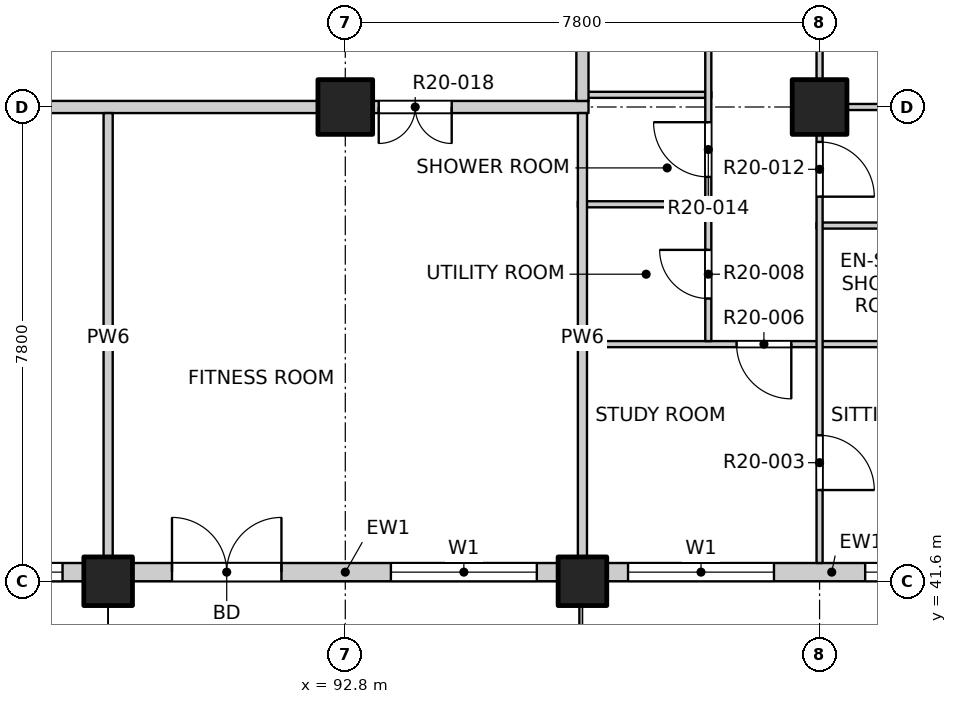
"""IFC4 building model, lengths in metres.
Left out: names, types, materials, properties, quantities, classifications, styles, units other than length and angle.
Written with IfcOpenShell. Run it as: python <this file> out.ifc"""

import sys

from ifc_helpers import new_model, si_unit, direction, frame, frame_2d, origin, origin_2d, place, context, subcontext, project, spatial, rectangle, extrude, element, fill, save


model = new_model("IFC4")
c1 = context("Model", 3, precision=1e-05, world=origin(), true_north=direction((0.0, 1.0)))
c2 = subcontext(c1, "Body", "Model", "MODEL_VIEW")
j1 = project(units=[si_unit("LENGTHUNIT", "METRE"), si_unit("PLANEANGLEUNIT", "RADIAN")], contexts=[c1])
p1 = place(None, origin())
s1 = spatial("IfcSite", under=j1, at=p1, CompositionType="ELEMENT")
p2 = place(p1, origin())
s2 = spatial("IfcBuilding", under=s1, at=p2, CompositionType="ELEMENT")
p3 = place(p2, frame((0.0, 0.0, 204.1)))
s3 = spatial("IfcBuildingStorey", under=s2, at=p3, CompositionType="ELEMENT", Elevation=204.1)
for number, where, z_axis, x_axis in (
    (1, (88.9, 41.6, -0.25), (0.0, 0.0, 1.0), (1.0, 0.0, 0.0)),
    (2, (96.7, 41.6, -0.25), (0.0, 0.0, 1.0), (1.0, 0.0, 0.0)),
):
    element("IfcColumn", number, at=place(p3, frame(where, z_axis=z_axis, x_axis=x_axis)), inside=s3, PredefinedType="COLUMN", context=c2, shape_type="SweptSolid", body=[
        extrude(rectangle(XDim=0.8, YDim=0.8, at=origin_2d()), origin(), (0.0, 0.0, 1.0), 3.4),
    ])
for number, where, z_axis, x_axis in (
    (3, (92.8, 49.4, -0.25), (0.0, 0.0, 1.0), (1.0, 0.0, 0.0)),
    (4, (100.6, 49.4, -0.25), (0.0, 0.0, 1.0), (1.0, 0.0, 0.0)),
):
    element("IfcColumn", number, at=place(p3, frame(where, z_axis=z_axis, x_axis=x_axis)), inside=s3, PredefinedType="COLUMN", context=c2, shape_type="SweptSolid", body=[
        extrude(rectangle(XDim=0.9, YDim=0.9, at=origin_2d()), origin(), (0.0, 0.0, 1.0), 3.4),
    ])
p4 = place(p3, frame((81.5, 41.75, 0.0), z_axis=(0.0, 0.0, 1.0), x_axis=(1.0, 0.0, 0.0)))
e5 = element("IfcWall", 5, at=p4, inside=s3, PredefinedType="SOLIDWALL", context=c2, shape_type="SweptSolid", body=[
    extrude(rectangle(XDim=7.0, YDim=0.3, at=frame_2d((3.5, 0.0))), origin(), (0.0, 0.0, 1.0), 2.7),
])
p5 = place(p4, frame((0.65, 0.0, 0.0)))
e6 = element("IfcOpeningElement", 6, at=p5, cuts=e5, PredefinedType="OPENING", context=c2, shape_type="SweptSolid", body=[
    extrude(rectangle(XDim=1.8, YDim=2.4, at=frame_2d((0.9, 1.2))), frame((0.0, 0.16, 0.0), z_axis=(0.0, -1.0, 0.0), x_axis=(1.0, 0.0, 0.0)), (0.0, 0.0, 1.0), 0.32),
])
p6 = place(p4, frame((4.25, 0.0, 0.9)))
e7 = element("IfcOpeningElement", 7, at=p6, cuts=e5, PredefinedType="OPENING", context=c2, shape_type="SweptSolid", body=[
    extrude(rectangle(XDim=2.4, YDim=1.8, at=frame_2d((1.2, 0.9))), frame((0.0, 0.16, 0.0), z_axis=(0.0, -1.0, 0.0), x_axis=(1.0, 0.0, 0.0)), (0.0, 0.0, 1.0), 0.32),
])
p7 = place(p3, frame((89.3, 41.75, 0.0), z_axis=(0.0, 0.0, 1.0), x_axis=(1.0, 0.0, 0.0)))
e8 = element("IfcWall", 8, at=p7, inside=s3, PredefinedType="SOLIDWALL", context=c2, shape_type="SweptSolid", body=[
    extrude(rectangle(XDim=7.0, YDim=0.3, at=frame_2d((3.5, 0.0))), origin(), (0.0, 0.0, 1.0), 2.7),
])
p8 = place(p7, frame((0.65, 0.0, 0.0)))
e9 = element("IfcOpeningElement", 9, at=p8, cuts=e8, PredefinedType="OPENING", context=c2, shape_type="SweptSolid", body=[
    extrude(rectangle(XDim=1.8, YDim=2.4, at=frame_2d((0.9, 1.2))), frame((0.0, 0.16, 0.0), z_axis=(0.0, -1.0, 0.0), x_axis=(1.0, 0.0, 0.0)), (0.0, 0.0, 1.0), 0.32),
])
p9 = place(p7, frame((4.25, 0.0, 0.9)))
e10 = element("IfcOpeningElement", 10, at=p9, cuts=e8, PredefinedType="OPENING", context=c2, shape_type="SweptSolid", body=[
    extrude(rectangle(XDim=2.4, YDim=1.8, at=frame_2d((1.2, 0.9))), frame((0.0, 0.16, 0.0), z_axis=(0.0, -1.0, 0.0), x_axis=(1.0, 0.0, 0.0)), (0.0, 0.0, 1.0), 0.32),
])
p10 = place(p3, frame((97.1, 41.75, 0.0), z_axis=(0.0, 0.0, 1.0), x_axis=(1.0, 0.0, 0.0)))
e11 = element("IfcWall", 11, at=p10, inside=s3, PredefinedType="SOLIDWALL", context=c2, shape_type="SweptSolid", body=[
    extrude(rectangle(XDim=7.4, YDim=0.3, at=frame_2d((3.7, 0.0))), origin(), (0.0, 0.0, 1.0), 2.7),
])
p11 = place(p10, frame((0.35, 0.0, 0.9)))
e12 = element("IfcOpeningElement", 12, at=p11, cuts=e11, PredefinedType="OPENING", context=c2, shape_type="SweptSolid", body=[
    extrude(rectangle(XDim=2.4, YDim=1.8, at=frame_2d((1.2, 0.9))), frame((0.0, 0.16, 0.0), z_axis=(0.0, -1.0, 0.0), x_axis=(1.0, 0.0, 0.0)), (0.0, 0.0, 1.0), 0.32),
])
p12 = place(p10, frame((4.25, 0.0, 0.9)))
e13 = element("IfcOpeningElement", 13, at=p12, cuts=e11, PredefinedType="OPENING", context=c2, shape_type="SweptSolid", body=[
    extrude(rectangle(XDim=2.4, YDim=1.8, at=frame_2d((1.2, 0.9))), frame((0.0, 0.16, 0.0), z_axis=(0.0, -1.0, 0.0), x_axis=(1.0, 0.0, 0.0)), (0.0, 0.0, 1.0), 0.32),
])
p13 = place(p3, frame((96.625, 45.5, 0.0), z_axis=(0.0, 0.0, 1.0), x_axis=(1.0, 0.0, 0.0)))
e14 = element("IfcWall", 14, at=p13, inside=s3, PredefinedType="PARTITIONING", context=c2, shape_type="SweptSolid", body=[
    extrude(rectangle(XDim=11.475, YDim=0.1, at=frame_2d((5.738, 0.0))), origin(), (0.0, 0.0, 1.0), 3.15),
])
p14 = place(p13, frame((2.61, 0.0, 0.0)))
e15 = element("IfcOpeningElement", 15, at=p14, cuts=e14, PredefinedType="OPENING", context=c2, shape_type="SweptSolid", body=[
    extrude(rectangle(XDim=0.9, YDim=2.1, at=frame_2d((0.45, 1.05))), frame((0.0, 0.06, 0.0), z_axis=(0.0, -1.0, 0.0), x_axis=(1.0, 0.0, 0.0)), (0.0, 0.0, 1.0), 0.12),
])
p15 = place(p3, frame((100.55, 47.45, 0.0), z_axis=(0.0, 0.0, 1.0), x_axis=(1.0, 0.0, 0.0)))
e16 = element("IfcWall", 16, at=p15, inside=s3, PredefinedType="PARTITIONING", context=c2, shape_type="SweptSolid", body=[
    extrude(rectangle(XDim=3.4, YDim=0.1, at=frame_2d((1.7, 0.0))), origin(), (0.0, 0.0, 1.0), 3.15),
])
p16 = place(p3, frame((96.625, 47.8, 0.0), z_axis=(0.0, 0.0, 1.0), x_axis=(1.0, 0.0, 0.0)))
e17 = element("IfcWall", 17, at=p16, inside=s3, PredefinedType="PARTITIONING", context=c2, shape_type="SweptSolid", body=[
    extrude(rectangle(XDim=2.195, YDim=0.1, at=frame_2d((1.098, 0.0))), origin(), (0.0, 0.0, 1.0), 3.15),
])
p17 = place(p3, frame((73.2, 49.4, 0.0), z_axis=(0.0, 0.0, 1.0), x_axis=(1.0, 0.0, 0.0)))
e18 = element("IfcWall", 18, at=p17, inside=s3, PredefinedType="PARTITIONING", context=c2, shape_type="SweptSolid", body=[
    extrude(rectangle(XDim=23.6, YDim=0.2, at=frame_2d((11.8, 0.0))), origin(), (0.0, 0.0, 1.0), 3.15),
])
p18 = place(p17, frame((1.6, 0.0, 0.0)))
e19 = element("IfcOpeningElement", 19, at=p18, cuts=e18, PredefinedType="OPENING", context=c2, shape_type="SweptSolid", body=[
    extrude(rectangle(XDim=0.9, YDim=2.1, at=frame_2d((0.45, 1.05))), frame((0.0, 0.11, 0.0), z_axis=(0.0, -1.0, 0.0), x_axis=(1.0, 0.0, 0.0)), (0.0, 0.0, 1.0), 0.22),
])
p19 = place(p17, frame((5.5, 0.0, 0.0)))
e20 = element("IfcOpeningElement", 20, at=p19, cuts=e18, PredefinedType="OPENING", context=c2, shape_type="SweptSolid", body=[
    extrude(rectangle(XDim=0.9, YDim=2.1, at=frame_2d((0.45, 1.05))), frame((0.0, 0.11, 0.0), z_axis=(0.0, -1.0, 0.0), x_axis=(1.0, 0.0, 0.0)), (0.0, 0.0, 1.0), 0.22),
])
p20 = place(p17, frame((12.375, 0.0, 0.0)))
e21 = element("IfcOpeningElement", 21, at=p20, cuts=e18, PredefinedType="OPENING", context=c2, shape_type="SweptSolid", body=[
    extrude(rectangle(XDim=1.2, YDim=2.1, at=frame_2d((0.6, 1.05))), frame((0.0, 0.11, 0.0), z_axis=(0.0, -1.0, 0.0), x_axis=(1.0, 0.0, 0.0)), (0.0, 0.0, 1.0), 0.22),
])
p21 = place(p17, frame((20.15, 0.0, 0.0)))
e22 = element("IfcOpeningElement", 22, at=p21, cuts=e18, PredefinedType="OPENING", context=c2, shape_type="SweptSolid", body=[
    extrude(rectangle(XDim=1.2, YDim=2.1, at=frame_2d((0.6, 1.05))), frame((0.0, 0.11, 0.0), z_axis=(0.0, -1.0, 0.0), x_axis=(1.0, 0.0, 0.0)), (0.0, 0.0, 1.0), 0.22),
])
p22 = place(p3, frame((100.55, 49.4, 0.0), z_axis=(0.0, 0.0, 1.0), x_axis=(1.0, 0.0, 0.0)))
e23 = element("IfcWall", 23, at=p22, inside=s3, PredefinedType="PARTITIONING", context=c2, shape_type="SweptSolid", body=[
    extrude(rectangle(XDim=7.55, YDim=0.1, at=frame_2d((3.775, 0.0))), origin(), (0.0, 0.0, 1.0), 3.15),
])
p23 = place(p3, frame((96.6, 49.6, 0.0), z_axis=(0.0, 0.0, 1.0), x_axis=(1.0, 0.0, 0.0)))
e24 = element("IfcWall", 24, at=p23, inside=s3, PredefinedType="PARTITIONING", context=c2, shape_type="SweptSolid", body=[
    extrude(rectangle(XDim=2.22, YDim=0.1, at=frame_2d((1.11, 0.0))), origin(), (0.0, 0.0, 1.0), 3.15),
])
p24 = place(p3, frame((88.9, 41.9, 0.0), z_axis=(0.0, 0.0, 1.0), x_axis=(0.0, 1.0, 0.0)))
e25 = element("IfcWall", 25, at=p24, inside=s3, PredefinedType="PARTITIONING", context=c2, shape_type="SweptSolid", body=[
    extrude(rectangle(XDim=7.4, YDim=0.15, at=frame_2d((3.7, 0.0))), origin(), (0.0, 0.0, 1.0), 2.55),
])
p25 = place(p3, frame((96.7, 41.9, 0.0), z_axis=(0.0, 0.0, 1.0), x_axis=(0.0, 1.0, 0.0)))
e26 = element("IfcWall", 26, at=p25, inside=s3, PredefinedType="PARTITIONING", context=c2, shape_type="SweptSolid", body=[
    extrude(rectangle(XDim=7.4, YDim=0.15, at=frame_2d((3.7, 0.0))), origin(), (0.0, 0.0, 1.0), 3.15),
])
p26 = place(p3, frame((96.7, 49.5, 0.0), z_axis=(0.0, 0.0, 1.0), x_axis=(0.0, 1.0, 0.0)))
e27 = element("IfcWall", 27, at=p26, inside=s3, PredefinedType="PARTITIONING", context=c2, shape_type="SweptSolid", body=[
    extrude(rectangle(XDim=34.9, YDim=0.2, at=frame_2d((17.45, 0.0))), origin(), (0.0, 0.0, 1.0), 3.15),
])
p27 = place(p26, frame((9.625, 0.0, 0.0)))
e28 = element("IfcOpeningElement", 28, at=p27, cuts=e27, PredefinedType="OPENING", context=c2, shape_type="SweptSolid", body=[
    extrude(rectangle(XDim=1.0, YDim=2.1, at=frame_2d((0.5, 1.05))), frame((0.0, 0.11, 0.0), z_axis=(0.0, -1.0, 0.0), x_axis=(1.0, 0.0, 0.0)), (0.0, 0.0, 1.0), 0.22),
])
p28 = place(p26, frame((14.125, 0.0, 0.0)))
e29 = element("IfcOpeningElement", 29, at=p28, cuts=e27, PredefinedType="OPENING", context=c2, shape_type="SweptSolid", body=[
    extrude(rectangle(XDim=1.0, YDim=2.1, at=frame_2d((0.5, 1.05))), frame((0.0, 0.11, 0.0), z_axis=(0.0, -1.0, 0.0), x_axis=(1.0, 0.0, 0.0)), (0.0, 0.0, 1.0), 0.22),
])
p29 = place(p26, frame((29.275, 0.0, 0.0)))
e30 = element("IfcOpeningElement", 30, at=p29, cuts=e27, PredefinedType="OPENING", context=c2, shape_type="SweptSolid", body=[
    extrude(rectangle(XDim=1.0, YDim=2.1, at=frame_2d((0.5, 1.05))), frame((0.0, 0.11, 0.0), z_axis=(0.0, -1.0, 0.0), x_axis=(1.0, 0.0, 0.0)), (0.0, 0.0, 1.0), 0.22),
])
p30 = place(p3, frame((98.77, 45.55, 0.0), z_axis=(0.0, 0.0, 1.0), x_axis=(0.0, 1.0, 0.0)))
e31 = element("IfcWall", 31, at=p30, inside=s3, PredefinedType="PARTITIONING", context=c2, shape_type="SweptSolid", body=[
    extrude(rectangle(XDim=12.25, YDim=0.1, at=frame_2d((6.125, 0.0))), origin(), (0.0, 0.0, 1.0), 3.15),
])
p31 = place(p30, frame((0.7, 0.0, 0.0)))
e32 = element("IfcOpeningElement", 32, at=p31, cuts=e31, PredefinedType="OPENING", context=c2, shape_type="SweptSolid", body=[
    extrude(rectangle(XDim=0.8, YDim=2.1, at=frame_2d((0.4, 1.05))), frame((0.0, 0.06, 0.0), z_axis=(0.0, -1.0, 0.0), x_axis=(1.0, 0.0, 0.0)), (0.0, 0.0, 1.0), 0.12),
])
p32 = place(p30, frame((2.7, 0.0, 0.0)))
e33 = element("IfcOpeningElement", 33, at=p32, cuts=e31, PredefinedType="OPENING", context=c2, shape_type="SweptSolid", body=[
    extrude(rectangle(XDim=0.9, YDim=2.1, at=frame_2d((0.45, 1.05))), frame((0.0, 0.06, 0.0), z_axis=(0.0, -1.0, 0.0), x_axis=(1.0, 0.0, 0.0)), (0.0, 0.0, 1.0), 0.12),
])
p33 = place(p30, frame((4.95, 0.0, 0.0)))
e34 = element("IfcOpeningElement", 34, at=p33, cuts=e31, PredefinedType="OPENING", context=c2, shape_type="SweptSolid", body=[
    extrude(rectangle(XDim=0.8, YDim=2.1, at=frame_2d((0.4, 1.05))), frame((0.0, 0.06, 0.0), z_axis=(0.0, -1.0, 0.0), x_axis=(1.0, 0.0, 0.0)), (0.0, 0.0, 1.0), 0.12),
])
p34 = place(p30, frame((7.415, 0.0, 0.0)))
e35 = element("IfcOpeningElement", 35, at=p34, cuts=e31, PredefinedType="OPENING", context=c2, shape_type="SweptSolid", body=[
    extrude(rectangle(XDim=0.9, YDim=2.1, at=frame_2d((0.45, 1.05))), frame((0.0, 0.06, 0.0), z_axis=(0.0, -1.0, 0.0), x_axis=(1.0, 0.0, 0.0)), (0.0, 0.0, 1.0), 0.12),
])
p35 = place(p30, frame((10.24, 0.0, 0.0)))
e36 = element("IfcOpeningElement", 36, at=p35, cuts=e31, PredefinedType="OPENING", context=c2, shape_type="SweptSolid", body=[
    extrude(rectangle(XDim=0.9, YDim=2.1, at=frame_2d((0.45, 1.05))), frame((0.0, 0.06, 0.0), z_axis=(0.0, -1.0, 0.0), x_axis=(1.0, 0.0, 0.0)), (0.0, 0.0, 1.0), 0.12),
])
p36 = place(p3, frame((100.6, 41.9, 0.0), z_axis=(0.0, 0.0, 1.0), x_axis=(0.0, 1.0, 0.0)))
e37 = element("IfcWall", 37, at=p36, inside=s3, PredefinedType="PARTITIONING", context=c2, shape_type="SweptSolid", body=[
    extrude(rectangle(XDim=46.2, YDim=0.1, at=frame_2d((23.1, 0.0))), origin(), (0.0, 0.0, 1.0), 3.15),
])
p37 = place(p36, frame((1.2, 0.0, 0.0)))
e38 = element("IfcOpeningElement", 38, at=p37, cuts=e37, PredefinedType="OPENING", context=c2, shape_type="SweptSolid", body=[
    extrude(rectangle(XDim=0.9, YDim=2.1, at=frame_2d((0.45, 1.05))), frame((0.0, 0.06, 0.0), z_axis=(0.0, -1.0, 0.0), x_axis=(1.0, 0.0, 0.0)), (0.0, 0.0, 1.0), 0.12),
])
p38 = place(p36, frame((6.025, 0.0, 0.0)))
e39 = element("IfcOpeningElement", 39, at=p38, cuts=e37, PredefinedType="OPENING", context=c2, shape_type="SweptSolid", body=[
    extrude(rectangle(XDim=0.9, YDim=2.1, at=frame_2d((0.45, 1.05))), frame((0.0, 0.06, 0.0), z_axis=(0.0, -1.0, 0.0), x_axis=(1.0, 0.0, 0.0)), (0.0, 0.0, 1.0), 0.12),
])
p39 = place(p36, frame((9.0, 0.0, 0.0)))
e40 = element("IfcOpeningElement", 40, at=p39, cuts=e37, PredefinedType="OPENING", context=c2, shape_type="SweptSolid", body=[
    extrude(rectangle(XDim=0.9, YDim=2.1, at=frame_2d((0.45, 1.05))), frame((0.0, 0.06, 0.0), z_axis=(0.0, -1.0, 0.0), x_axis=(1.0, 0.0, 0.0)), (0.0, 0.0, 1.0), 0.12),
])
p40 = place(p36, frame((13.85, 0.0, 0.0)))
e41 = element("IfcOpeningElement", 41, at=p40, cuts=e37, PredefinedType="OPENING", context=c2, shape_type="SweptSolid", body=[
    extrude(rectangle(XDim=0.9, YDim=2.1, at=frame_2d((0.45, 1.05))), frame((0.0, 0.06, 0.0), z_axis=(0.0, -1.0, 0.0), x_axis=(1.0, 0.0, 0.0)), (0.0, 0.0, 1.0), 0.12),
])
p41 = place(p36, frame((17.775, 0.0, 0.0)))
e42 = element("IfcOpeningElement", 42, at=p41, cuts=e37, PredefinedType="OPENING", context=c2, shape_type="SweptSolid", body=[
    extrude(rectangle(XDim=0.9, YDim=2.1, at=frame_2d((0.45, 1.05))), frame((0.0, 0.06, 0.0), z_axis=(0.0, -1.0, 0.0), x_axis=(1.0, 0.0, 0.0)), (0.0, 0.0, 1.0), 0.12),
])
p42 = place(p36, frame((20.7, 0.0, 0.0)))
e43 = element("IfcOpeningElement", 43, at=p42, cuts=e37, PredefinedType="OPENING", context=c2, shape_type="SweptSolid", body=[
    extrude(rectangle(XDim=0.9, YDim=2.1, at=frame_2d((0.45, 1.05))), frame((0.0, 0.06, 0.0), z_axis=(0.0, -1.0, 0.0), x_axis=(1.0, 0.0, 0.0)), (0.0, 0.0, 1.0), 0.12),
])
p43 = place(p36, frame((24.6, 0.0, 0.0)))
e44 = element("IfcOpeningElement", 44, at=p43, cuts=e37, PredefinedType="OPENING", context=c2, shape_type="SweptSolid", body=[
    extrude(rectangle(XDim=0.9, YDim=2.1, at=frame_2d((0.45, 1.05))), frame((0.0, 0.06, 0.0), z_axis=(0.0, -1.0, 0.0), x_axis=(1.0, 0.0, 0.0)), (0.0, 0.0, 1.0), 0.12),
])
p44 = place(p36, frame((29.425, 0.0, 0.0)))
e45 = element("IfcOpeningElement", 45, at=p44, cuts=e37, PredefinedType="OPENING", context=c2, shape_type="SweptSolid", body=[
    extrude(rectangle(XDim=0.9, YDim=2.1, at=frame_2d((0.45, 1.05))), frame((0.0, 0.06, 0.0), z_axis=(0.0, -1.0, 0.0), x_axis=(1.0, 0.0, 0.0)), (0.0, 0.0, 1.0), 0.12),
])
p45 = place(p36, frame((33.375, 0.0, 0.0)))
e46 = element("IfcOpeningElement", 46, at=p45, cuts=e37, PredefinedType="OPENING", context=c2, shape_type="SweptSolid", body=[
    extrude(rectangle(XDim=0.9, YDim=2.1, at=frame_2d((0.45, 1.05))), frame((0.0, 0.06, 0.0), z_axis=(0.0, -1.0, 0.0), x_axis=(1.0, 0.0, 0.0)), (0.0, 0.0, 1.0), 0.12),
])
p46 = place(p36, frame((36.3, 0.0, 0.0)))
e47 = element("IfcOpeningElement", 47, at=p46, cuts=e37, PredefinedType="OPENING", context=c2, shape_type="SweptSolid", body=[
    extrude(rectangle(XDim=0.9, YDim=2.1, at=frame_2d((0.45, 1.05))), frame((0.0, 0.06, 0.0), z_axis=(0.0, -1.0, 0.0), x_axis=(1.0, 0.0, 0.0)), (0.0, 0.0, 1.0), 0.12),
])
p47 = place(p36, frame((41.175, 0.0, 0.0)))
e48 = element("IfcOpeningElement", 48, at=p47, cuts=e37, PredefinedType="OPENING", context=c2, shape_type="SweptSolid", body=[
    extrude(rectangle(XDim=0.9, YDim=2.1, at=frame_2d((0.45, 1.05))), frame((0.0, 0.06, 0.0), z_axis=(0.0, -1.0, 0.0), x_axis=(1.0, 0.0, 0.0)), (0.0, 0.0, 1.0), 0.12),
])
p48 = place(p36, frame((44.1, 0.0, 0.0)))
e49 = element("IfcOpeningElement", 49, at=p48, cuts=e37, PredefinedType="OPENING", context=c2, shape_type="SweptSolid", body=[
    extrude(rectangle(XDim=0.9, YDim=2.1, at=frame_2d((0.45, 1.05))), frame((0.0, 0.06, 0.0), z_axis=(0.0, -1.0, 0.0), x_axis=(1.0, 0.0, 0.0)), (0.0, 0.0, 1.0), 0.12),
])
p49 = place(p6, origin())
e50 = element("IfcWindow", 50, at=p49, inside=s3, PartitioningType="DOUBLE_PANEL_VERTICAL", PredefinedType="WINDOW", context=c2, shape_type="SweptSolid", body=[
    extrude(rectangle(XDim=2.4, YDim=1.8, at=frame_2d((1.2, 0.9))), frame((0.0, 0.03, 0.0), z_axis=(0.0, -1.0, 0.0), x_axis=(1.0, 0.0, 0.0)), (0.0, 0.0, 1.0), 0.06),
])
fill(e7, e50)
p50 = place(p8, origin())
e51 = element("IfcDoor", 51, at=p50, inside=s3, OperationType="DOUBLE_DOOR_SINGLE_SWING", PredefinedType="DOOR", context=c2, shape_type="SweptSolid", body=[
    extrude(rectangle(XDim=1.8, YDim=2.4, at=frame_2d((0.9, 1.2))), frame((0.0, 0.025, 0.0), z_axis=(0.0, -1.0, 0.0), x_axis=(1.0, 0.0, 0.0)), (0.0, 0.0, 1.0), 0.05),
])
fill(e9, e51)
p51 = place(p9, origin())
e52 = element("IfcWindow", 52, at=p51, inside=s3, PartitioningType="DOUBLE_PANEL_VERTICAL", PredefinedType="WINDOW", context=c2, shape_type="SweptSolid", body=[
    extrude(rectangle(XDim=2.4, YDim=1.8, at=frame_2d((1.2, 0.9))), frame((0.0, 0.03, 0.0), z_axis=(0.0, -1.0, 0.0), x_axis=(1.0, 0.0, 0.0)), (0.0, 0.0, 1.0), 0.06),
])
fill(e10, e52)
p52 = place(p11, origin())
e53 = element("IfcWindow", 53, at=p52, inside=s3, PartitioningType="DOUBLE_PANEL_VERTICAL", PredefinedType="WINDOW", context=c2, shape_type="SweptSolid", body=[
    extrude(rectangle(XDim=2.4, YDim=1.8, at=frame_2d((1.2, 0.9))), frame((0.0, 0.03, 0.0), z_axis=(0.0, -1.0, 0.0), x_axis=(1.0, 0.0, 0.0)), (0.0, 0.0, 1.0), 0.06),
])
fill(e12, e53)
p53 = place(p12, origin())
e54 = element("IfcWindow", 54, at=p53, inside=s3, PartitioningType="DOUBLE_PANEL_VERTICAL", PredefinedType="WINDOW", context=c2, shape_type="SweptSolid", body=[
    extrude(rectangle(XDim=2.4, YDim=1.8, at=frame_2d((1.2, 0.9))), frame((0.0, 0.03, 0.0), z_axis=(0.0, -1.0, 0.0), x_axis=(1.0, 0.0, 0.0)), (0.0, 0.0, 1.0), 0.06),
])
fill(e13, e54)
p54 = place(p37, origin())
e55 = element("IfcDoor", 55, at=p54, inside=s3, OperationType="SINGLE_SWING_RIGHT", PredefinedType="DOOR", context=c2, shape_type="SweptSolid", body=[
    extrude(rectangle(XDim=0.9, YDim=2.1, at=frame_2d((0.45, 1.05))), frame((0.0, 0.025, 0.0), z_axis=(0.0, -1.0, 0.0), x_axis=(1.0, 0.0, 0.0)), (0.0, 0.0, 1.0), 0.05),
])
fill(e38, e55)
p55 = place(p14, origin())
e56 = element("IfcDoor", 56, at=p55, inside=s3, OperationType="SINGLE_SWING_LEFT", PredefinedType="DOOR", context=c2, shape_type="SweptSolid", body=[
    extrude(rectangle(XDim=0.9, YDim=2.1, at=frame_2d((0.45, 1.05))), frame((0.0, 0.025, 0.0), z_axis=(0.0, -1.0, 0.0), x_axis=(1.0, 0.0, 0.0)), (0.0, 0.0, 1.0), 0.05),
])
fill(e15, e56)
p56 = place(p31, origin())
e57 = element("IfcDoor", 57, at=p56, inside=s3, OperationType="SINGLE_SWING_RIGHT", PredefinedType="DOOR", context=c2, shape_type="SweptSolid", body=[
    extrude(rectangle(XDim=0.8, YDim=2.1, at=frame_2d((0.4, 1.05))), frame((0.0, 0.025, 0.0), z_axis=(0.0, -1.0, 0.0), x_axis=(1.0, 0.0, 0.0)), (0.0, 0.0, 1.0), 0.05),
])
fill(e32, e57)
p57 = place(p38, origin())
e58 = element("IfcDoor", 58, at=p57, inside=s3, OperationType="SINGLE_SWING_RIGHT", PredefinedType="DOOR", context=c2, shape_type="SweptSolid", body=[
    extrude(rectangle(XDim=0.9, YDim=2.1, at=frame_2d((0.45, 1.05))), frame((0.0, 0.025, 0.0), z_axis=(0.0, -1.0, 0.0), x_axis=(1.0, 0.0, 0.0)), (0.0, 0.0, 1.0), 0.05),
])
fill(e39, e58)
p58 = place(p32, origin())
e59 = element("IfcDoor", 59, at=p58, inside=s3, OperationType="SINGLE_SWING_RIGHT", PredefinedType="DOOR", context=c2, shape_type="SweptSolid", body=[
    extrude(rectangle(XDim=0.9, YDim=2.1, at=frame_2d((0.45, 1.05))), frame((0.0, 0.025, 0.0), z_axis=(0.0, -1.0, 0.0), x_axis=(1.0, 0.0, 0.0)), (0.0, 0.0, 1.0), 0.05),
])
fill(e33, e59)
p59 = place(p21, origin())
e60 = element("IfcDoor", 60, at=p59, inside=s3, OperationType="DOUBLE_DOOR_SINGLE_SWING", PredefinedType="DOOR", context=c2, shape_type="SweptSolid", body=[
    extrude(rectangle(XDim=1.2, YDim=2.1, at=frame_2d((0.6, 1.05))), frame((0.0, 0.025, 0.0), z_axis=(0.0, -1.0, 0.0), x_axis=(1.0, 0.0, 0.0)), (0.0, 0.0, 1.0), 0.05),
])
fill(e22, e60)
save(model, sys.argv[1])
